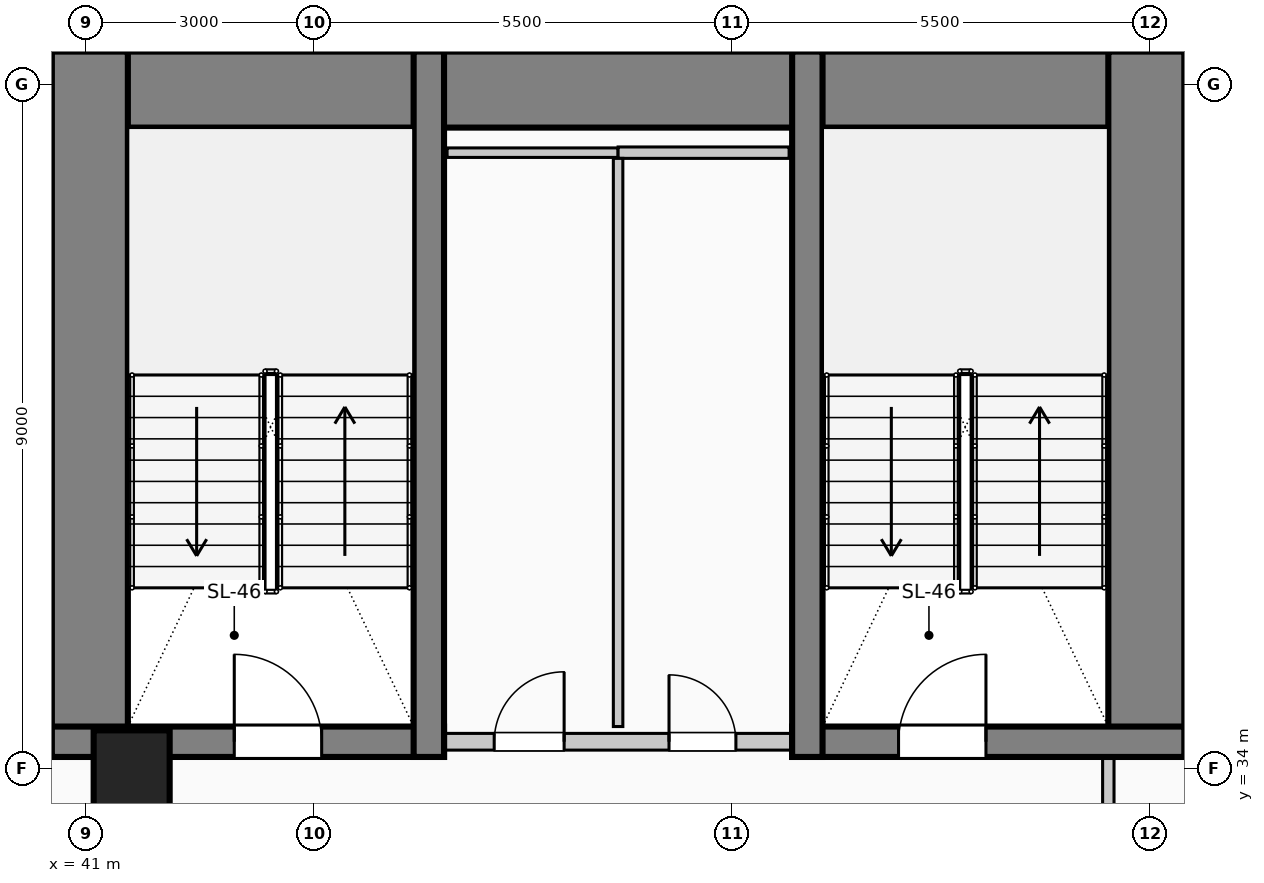
"""IFC4 building model, lengths in metres.
Left out: names, types, materials, properties, quantities, classifications, styles, units other than length and angle.
Written with IfcOpenShell. Run it as: python <this file> out.ifc"""

import sys

from ifc_helpers import new_model, si_unit, direction, frame, frame_2d, origin, origin_2d, place, context, subcontext, project, spatial, rectangle, circle, extrude, element, fill, save


model = new_model("IFC4")
c1 = context("Model", 3, precision=1e-05, world=origin(), true_north=direction((0.0, 1.0)))
c2 = subcontext(c1, "Body", "Model", "MODEL_VIEW")
j1 = project(units=[si_unit("LENGTHUNIT", "METRE"), si_unit("PLANEANGLEUNIT", "RADIAN")], contexts=[c1])
p1 = place(None, origin())
s1 = spatial("IfcSite", under=j1, at=p1, CompositionType="ELEMENT")
p2 = place(p1, origin())
s2 = spatial("IfcBuilding", under=s1, at=p2, CompositionType="ELEMENT")
p3 = place(p2, frame((0.0, 0.0, 54.6)))
s3 = spatial("IfcBuildingStorey", under=s2, at=p3, CompositionType="ELEMENT", Elevation=54.6)
p4 = place(p3, frame((40.55, 42.93, 0.0), z_axis=(0.0, 0.0, 1.0), x_axis=(1.0, 0.0, 0.0)))
e1 = element("IfcWall", 1, at=p4, inside=s3, PredefinedType="SHEAR", context=c2, shape_type="SweptSolid", body=[
    extrude(rectangle(XDim=14.9, YDim=1.0, at=frame_2d((7.45, 0.0))), origin(), (0.0, 0.0, 1.0), 4.0),
])
for number, where, z_axis, x_axis in (
    (2, (41.05, 34.15, 0.0), (0.0, 0.0, 1.0), (0.0, 1.0, 0.0)),
    (3, (54.95, 34.15, 0.0), (0.0, 0.0, 1.0), (0.0, 1.0, 0.0)),
):
    element("IfcWall", number, at=place(p3, frame(where, z_axis=z_axis, x_axis=x_axis)), inside=s3, PredefinedType="SHEAR", context=c2, shape_type="SweptSolid", body=[
        extrude(rectangle(XDim=9.28, YDim=1.0, at=frame_2d((4.64, 0.0))), origin(), (0.0, 0.0, 1.0), 4.0),
    ])
p5 = place(p3, frame((40.55, 34.35, 0.0), z_axis=(0.0, 0.0, 1.0), x_axis=(1.0, 0.0, 0.0)))
e4 = element("IfcWall", 4, at=p5, inside=s3, PredefinedType="SHEAR", context=c2, shape_type="SweptSolid", body=[
    extrude(rectangle(XDim=5.16, YDim=0.4, at=frame_2d((2.58, 0.0))), origin(), (0.0, 0.0, 1.0), 4.0),
])
p6 = place(p5, frame((2.4, 0.0, 0.0)))
e5 = element("IfcOpeningElement", 5, at=p6, cuts=e4, PredefinedType="OPENING", context=c2, shape_type="SweptSolid", body=[
    extrude(rectangle(XDim=1.15, YDim=2.2, at=frame_2d((0.575, 1.1))), frame((0.0, 0.21, 0.0), z_axis=(0.0, -1.0, 0.0), x_axis=(1.0, 0.0, 0.0)), (0.0, 0.0, 1.0), 0.42),
])
p7 = place(p3, frame((45.51, 34.15, 0.0), z_axis=(0.0, 0.0, 1.0), x_axis=(0.0, 1.0, 0.0)))
e6 = element("IfcWall", 6, at=p7, inside=s3, PredefinedType="SHEAR", context=c2, shape_type="SweptSolid", body=[
    extrude(rectangle(XDim=9.28, YDim=0.4, at=frame_2d((4.64, 0.0))), origin(), (0.0, 0.0, 1.0), 4.0),
])
p8 = place(p3, frame((50.29, 34.35, 0.0), z_axis=(0.0, 0.0, 1.0), x_axis=(1.0, 0.0, 0.0)))
e7 = element("IfcWall", 7, at=p8, inside=s3, PredefinedType="SHEAR", context=c2, shape_type="SweptSolid", body=[
    extrude(rectangle(XDim=5.16, YDim=0.4, at=frame_2d((2.58, 0.0))), origin(), (0.0, 0.0, 1.0), 4.0),
])
p9 = place(p8, frame((1.4, 0.0, 0.0)))
e8 = element("IfcOpeningElement", 8, at=p9, cuts=e7, PredefinedType="OPENING", context=c2, shape_type="SweptSolid", body=[
    extrude(rectangle(XDim=1.15, YDim=2.2, at=frame_2d((0.575, 1.1))), frame((0.0, 0.21, 0.0), z_axis=(0.0, -1.0, 0.0), x_axis=(1.0, 0.0, 0.0)), (0.0, 0.0, 1.0), 0.42),
])
p10 = place(p3, frame((50.49, 34.15, 0.0), z_axis=(0.0, 0.0, 1.0), x_axis=(0.0, 1.0, 0.0)))
e9 = element("IfcWall", 9, at=p10, inside=s3, PredefinedType="SHEAR", context=c2, shape_type="SweptSolid", body=[
    extrude(rectangle(XDim=9.28, YDim=0.4, at=frame_2d((4.64, 0.0))), origin(), (0.0, 0.0, 1.0), 4.0),
])
p11 = place(p3, frame((41.6, 34.0, 0.0), z_axis=(0.0, 0.0, 1.0), x_axis=(1.0, 0.0, 0.0)))
e10 = element("IfcColumn", 10, at=p11, inside=s3, PredefinedType="COLUMN", context=c2, shape_type="SweptSolid", body=[
    extrude(circle(Radius=0.5, at=origin_2d()), origin(), (0.0, 0.0, 1.0), 4.0),
])
p12 = place(p3, frame((45.72, 34.35, 0.0), z_axis=(0.0, 0.0, 1.0), x_axis=(1.0, 0.0, 0.0)))
e11 = element("IfcWall", 11, at=p12, inside=s3, PredefinedType="PARTITIONING", context=c2, shape_type="SweptSolid", body=[
    extrude(rectangle(XDim=4.56, YDim=0.22, at=frame_2d((2.28, 0.0))), origin(), (0.0, 0.0, 1.0), 3.7),
])
p13 = place(p12, frame((0.65, 0.0, 0.0)))
e12 = element("IfcOpeningElement", 12, at=p13, cuts=e11, PredefinedType="OPENING", context=c2, shape_type="SweptSolid", body=[
    extrude(rectangle(XDim=0.92, YDim=2.1, at=frame_2d((0.46, 1.05))), frame((0.0, 0.12, 0.0), z_axis=(0.0, -1.0, 0.0), x_axis=(1.0, 0.0, 0.0)), (0.0, 0.0, 1.0), 0.24),
])
p14 = place(p12, frame((2.95, 0.0, 0.0)))
e13 = element("IfcOpeningElement", 13, at=p14, cuts=e11, PredefinedType="OPENING", context=c2, shape_type="SweptSolid", body=[
    extrude(rectangle(XDim=0.88, YDim=2.1, at=frame_2d((0.44, 1.05))), frame((0.0, 0.12, 0.0), z_axis=(0.0, -1.0, 0.0), x_axis=(1.0, 0.0, 0.0)), (0.0, 0.0, 1.0), 0.24),
])
p15 = place(p3, frame((45.75, 42.1, 0.0), z_axis=(0.0, 0.0, 1.0), x_axis=(1.0, 0.0, 0.0)))
e14 = element("IfcWall", 14, at=p15, inside=s3, PredefinedType="PARTITIONING", context=c2, shape_type="SweptSolid", body=[
    extrude(rectangle(XDim=2.25, YDim=0.125, at=frame_2d((1.125, 0.0))), origin(), (0.0, 0.0, 1.0), 3.7),
])
p16 = place(p3, frame((48.0, 42.1, 0.0), z_axis=(0.0, 0.0, 1.0), x_axis=(1.0, 0.0, 0.0)))
e15 = element("IfcWall", 15, at=p16, inside=s3, PredefinedType="PARTITIONING", context=c2, shape_type="SweptSolid", body=[
    extrude(rectangle(XDim=2.25, YDim=0.15, at=frame_2d((1.125, 0.0))), origin(), (0.0, 0.0, 1.0), 3.7),
])
p17 = place(p3, frame((41.55, 43.43, 0.0), z_axis=(0.0, 0.0, 1.0), x_axis=(0.0, 1.0, 0.0)))
e16 = element("IfcWall", 16, at=p17, inside=s3, PredefinedType="PARTITIONING", context=c2, shape_type="SweptSolid", body=[
    extrude(rectangle(XDim=1.22, YDim=0.15, at=frame_2d((0.61, 0.0))), origin(), (0.0, 0.0, 1.0), 3.7),
])
p18 = place(p3, frame((48.0, 34.55, 0.0), z_axis=(0.0, 0.0, 1.0), x_axis=(0.0, 1.0, 0.0)))
e17 = element("IfcWall", 17, at=p18, inside=s3, PredefinedType="PARTITIONING", context=c2, shape_type="SweptSolid", body=[
    extrude(rectangle(XDim=7.475, YDim=0.125, at=frame_2d((3.737, 0.0))), origin(), (0.0, 0.0, 1.0), 3.7),
])
p19 = place(p3, frame((54.45, 32.425, 0.0), z_axis=(0.0, 0.0, 1.0), x_axis=(0.0, 1.0, 0.0)))
e18 = element("IfcWall", 18, at=p19, inside=s3, PredefinedType="PARTITIONING", context=c2, shape_type="SweptSolid", body=[
    extrude(rectangle(XDim=1.725, YDim=0.15, at=frame_2d((0.862, 0.0))), origin(), (0.0, 0.0, 1.0), 3.7),
])
p20 = place(p6, origin())
e19 = element("IfcDoor", 19, at=p20, inside=s3, OperationType="SINGLE_SWING_LEFT", PredefinedType="DOOR", context=c2, shape_type="SweptSolid", body=[
    extrude(rectangle(XDim=1.15, YDim=2.2, at=frame_2d((0.575, 1.1))), frame((0.0, 0.025, 0.0), z_axis=(0.0, -1.0, 0.0), x_axis=(1.0, 0.0, 0.0)), (0.0, 0.0, 1.0), 0.05),
])
fill(e5, e19)
p21 = place(p13, origin())
e20 = element("IfcDoor", 20, at=p21, inside=s3, OperationType="SINGLE_SWING_RIGHT", PredefinedType="DOOR", context=c2, shape_type="SweptSolid", body=[
    extrude(rectangle(XDim=0.92, YDim=2.1, at=frame_2d((0.46, 1.05))), frame((0.0, 0.025, 0.0), z_axis=(0.0, -1.0, 0.0), x_axis=(1.0, 0.0, 0.0)), (0.0, 0.0, 1.0), 0.05),
])
fill(e12, e20)
p22 = place(p14, origin())
e21 = element("IfcDoor", 21, at=p22, inside=s3, OperationType="SINGLE_SWING_LEFT", PredefinedType="DOOR", context=c2, shape_type="SweptSolid", body=[
    extrude(rectangle(XDim=0.88, YDim=2.1, at=frame_2d((0.44, 1.05))), frame((0.0, 0.025, 0.0), z_axis=(0.0, -1.0, 0.0), x_axis=(1.0, 0.0, 0.0)), (0.0, 0.0, 1.0), 0.05),
])
fill(e13, e21)
p23 = place(p9, origin())
e22 = element("IfcDoor", 22, at=p23, inside=s3, OperationType="SINGLE_SWING_RIGHT", PredefinedType="DOOR", context=c2, shape_type="SweptSolid", body=[
    extrude(rectangle(XDim=1.15, YDim=2.2, at=frame_2d((0.575, 1.1))), frame((0.0, 0.025, 0.0), z_axis=(0.0, -1.0, 0.0), x_axis=(1.0, 0.0, 0.0)), (0.0, 0.0, 1.0), 0.05),
])
fill(e8, e22)
save(model, sys.argv[1])
